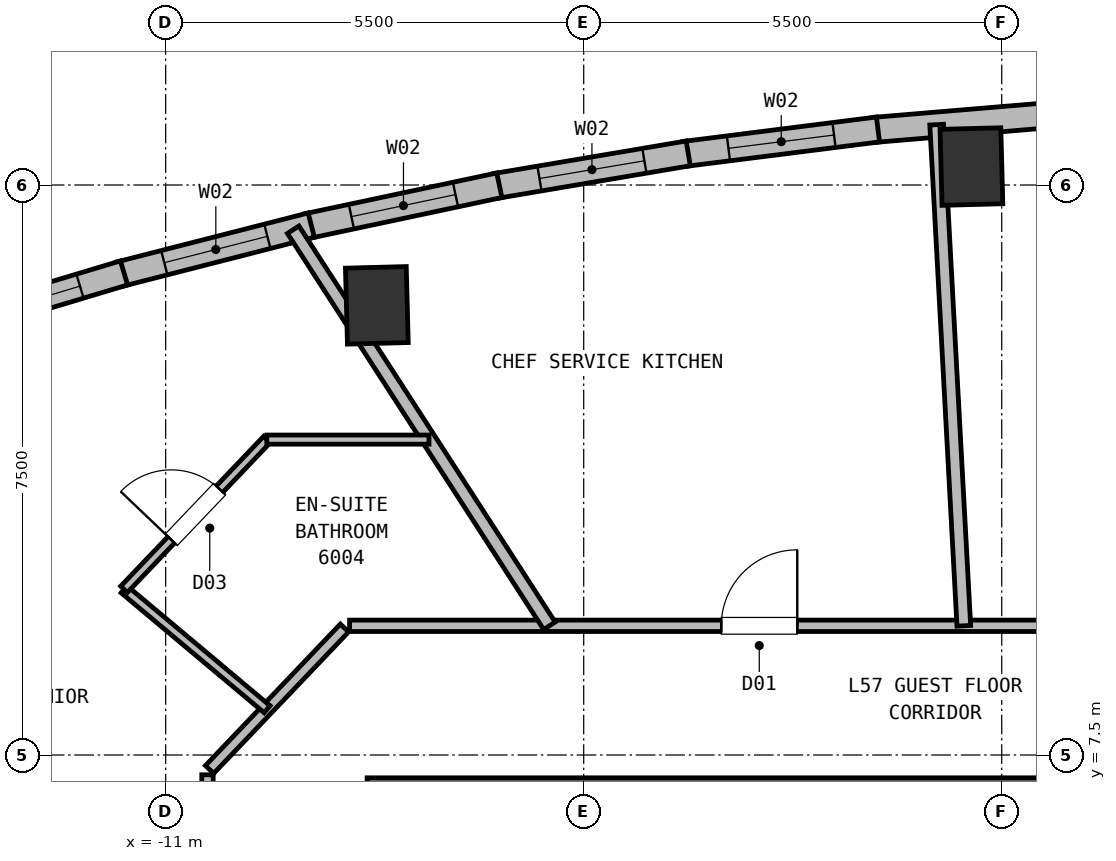
"""IFC4 building model, lengths in metres.
Left out: names, types, materials, properties, quantities, classifications, styles, units other than length and angle.
Written with IfcOpenShell. Run it as: python <this file> out.ifc"""

import sys

from ifc_helpers import new_model, si_unit, direction, frame, frame_2d, origin, origin_2d, place, context, subcontext, project, spatial, rectangle, extrude, element, fill, save


model = new_model("IFC4")
c1 = context("Model", 3, precision=1e-05, world=origin(), true_north=direction((0.0, 1.0)))
c2 = subcontext(c1, "Body", "Model", "MODEL_VIEW")
j1 = project(units=[si_unit("LENGTHUNIT", "METRE"), si_unit("PLANEANGLEUNIT", "RADIAN")], contexts=[c1])
p1 = place(None, origin())
s1 = spatial("IfcSite", under=j1, at=p1, CompositionType="ELEMENT")
p2 = place(p1, origin())
s2 = spatial("IfcBuilding", under=s1, at=p2, CompositionType="ELEMENT")
p3 = place(p2, frame((0.0, 0.0, 228.35)))
s3 = spatial("IfcBuildingStorey", under=s2, at=p3, CompositionType="ELEMENT", Elevation=228.35)
p4 = place(p3, frame((-8.35, 6.95, 0.0), z_axis=(0.0, 0.0, 1.0), x_axis=(1.0, 0.0, 0.0)))
e1 = element("IfcWall", 1, at=p4, inside=s3, PredefinedType="SHEAR", context=c2, shape_type="SweptSolid", body=[
    extrude(rectangle(XDim=16.7, YDim=0.5, at=frame_2d((8.35, 0.0))), origin(), (0.0, 0.0, 1.0), 3.55),
])
for number, where, z_axis, x_axis in (
    (2, (-0.399, 15.243, 0.0), (0.0, 0.0, 1.0), (1.0, 0.026, 0.0)),
    (3, (-8.222, 13.417, 0.0), (0.0, 0.0, 1.0), (1.0, 0.026, 0.0)),
):
    element("IfcColumn", number, at=place(p3, frame(where, z_axis=z_axis, x_axis=x_axis)), inside=s3, PredefinedType="COLUMN", context=c2, shape_type="SweptSolid", body=[
        extrude(rectangle(XDim=0.8, YDim=1.0, at=origin_2d()), origin(), (0.0, 0.0, 1.0), 3.8),
    ])
p5 = place(p3, frame((-1.678, 15.725, 0.0), z_axis=(0.0, 0.0, 1.0), x_axis=(0.996489100747, 0.083722590095, 0.0)))
e4 = element("IfcWall", 4, at=p5, inside=s3, PredefinedType="SOLIDWALL", context=c2, shape_type="SweptSolid", body=[
    extrude(rectangle(XDim=2.566, YDim=0.33, at=frame_2d((1.283, 0.0))), origin(), (0.0, 0.0, 1.0), 3.55),
])
p6 = place(p3, frame((-4.174, 15.409, 0.0), z_axis=(0.0, 0.0, 1.0), x_axis=(0.992107160936, 0.125392907376, 0.0)))
e5 = element("IfcWall", 5, at=p6, inside=s3, PredefinedType="SOLIDWALL", context=c2, shape_type="SweptSolid", body=[
    extrude(rectangle(XDim=2.566, YDim=0.33, at=frame_2d((1.283, 0.0))), origin(), (0.0, 0.0, 1.0), 3.55),
])
p7 = place(p6, frame((0.583, 0.0, 0.72)))
e6 = element("IfcOpeningElement", 6, at=p7, cuts=e5, PredefinedType="OPENING", context=c2, shape_type="SweptSolid", body=[
    extrude(rectangle(XDim=1.4, YDim=1.84, at=frame_2d((0.7, 0.92))), frame((0.0, 0.175, 0.0), z_axis=(0.0, -1.0, 0.0), x_axis=(1.0, 0.0, 0.0)), (0.0, 0.0, 1.0), 0.35),
])
p8 = place(p3, frame((-6.659, 14.988, 0.0), z_axis=(0.0, 0.0, 1.0), x_axis=(0.985993143287, 0.16678585489, 0.0)))
e7 = element("IfcWall", 7, at=p8, inside=s3, PredefinedType="SOLIDWALL", context=c2, shape_type="SweptSolid", body=[
    extrude(rectangle(XDim=2.57, YDim=0.33, at=frame_2d((1.285, 0.0))), origin(), (0.0, 0.0, 1.0), 3.55),
])
p9 = place(p8, frame((0.585, 0.0, 0.72)))
e8 = element("IfcOpeningElement", 8, at=p9, cuts=e7, PredefinedType="OPENING", context=c2, shape_type="SweptSolid", body=[
    extrude(rectangle(XDim=1.4, YDim=1.84, at=frame_2d((0.7, 0.92))), frame((0.0, 0.175, 0.0), z_axis=(0.0, -1.0, 0.0), x_axis=(1.0, 0.0, 0.0)), (0.0, 0.0, 1.0), 0.35),
])
p10 = place(p3, frame((-9.133, 14.461, 0.0), z_axis=(0.0, 0.0, 1.0), x_axis=(0.978200927103, 0.207660651579, 0.0)))
e9 = element("IfcWall", 9, at=p10, inside=s3, PredefinedType="SOLIDWALL", context=c2, shape_type="SweptSolid", body=[
    extrude(rectangle(XDim=2.579, YDim=0.33, at=frame_2d((1.29, 0.0))), origin(), (0.0, 0.0, 1.0), 3.55),
])
p11 = place(p10, frame((0.59, 0.0, 0.72)))
e10 = element("IfcOpeningElement", 10, at=p11, cuts=e9, PredefinedType="OPENING", context=c2, shape_type="SweptSolid", body=[
    extrude(rectangle(XDim=1.4, YDim=1.84, at=frame_2d((0.7, 0.92))), frame((0.0, 0.175, 0.0), z_axis=(0.0, -1.0, 0.0), x_axis=(1.0, 0.0, 0.0)), (0.0, 0.0, 1.0), 0.35),
])
p12 = place(p3, frame((-11.596, 13.83, 0.0), z_axis=(0.0, 0.0, 1.0), x_axis=(0.968775883115, 0.247938073507, 0.0)))
e11 = element("IfcWall", 11, at=p12, inside=s3, PredefinedType="SOLIDWALL", context=c2, shape_type="SweptSolid", body=[
    extrude(rectangle(XDim=2.593, YDim=0.33, at=frame_2d((1.296, 0.0))), origin(), (0.0, 0.0, 1.0), 3.55),
])
p13 = place(p12, frame((0.596, 0.0, 0.72)))
e12 = element("IfcOpeningElement", 12, at=p13, cuts=e11, PredefinedType="OPENING", context=c2, shape_type="SweptSolid", body=[
    extrude(rectangle(XDim=1.4, YDim=1.84, at=frame_2d((0.7, 0.92))), frame((0.0, 0.175, 0.0), z_axis=(0.0, -1.0, 0.0), x_axis=(1.0, 0.0, 0.0)), (0.0, 0.0, 1.0), 0.35),
])
p14 = place(p3, frame((-14.048, 13.094, 0.0), z_axis=(0.0, 0.0, 1.0), x_axis=(0.957870045739, 0.287201976796, 0.0)))
e13 = element("IfcWall", 13, at=p14, inside=s3, PredefinedType="SOLIDWALL", context=c2, shape_type="SweptSolid", body=[
    extrude(rectangle(XDim=2.61, YDim=0.33, at=frame_2d((1.305, 0.0))), origin(), (0.0, 0.0, 1.0), 3.55),
])
p15 = place(p14, frame((0.605, 0.0, 0.72)))
e14 = element("IfcOpeningElement", 14, at=p15, cuts=e13, PredefinedType="OPENING", context=c2, shape_type="SweptSolid", body=[
    extrude(rectangle(XDim=1.4, YDim=1.84, at=frame_2d((0.7, 0.92))), frame((0.0, 0.175, 0.0), z_axis=(0.0, -1.0, 0.0), x_axis=(1.0, 0.0, 0.0)), (0.0, 0.0, 1.0), 0.35),
])
p16 = place(p3, frame((-8.58, 9.2, 0.0), z_axis=(0.0, 0.0, 1.0), x_axis=(1.0, 0.0, 0.0)))
e15 = element("IfcWall", 15, at=p16, inside=s3, PredefinedType="PARTITIONING", context=c2, shape_type="SweptSolid", body=[
    extrude(rectangle(XDim=17.16, YDim=0.15, at=frame_2d((8.58, 0.0))), origin(), (0.0, 0.0, 1.0), 3.55),
])
p17 = place(p16, frame((4.89, 0.0, 0.0)))
e16 = element("IfcOpeningElement", 16, at=p17, cuts=e15, PredefinedType="OPENING", context=c2, shape_type="SweptSolid", body=[
    extrude(rectangle(XDim=1.0, YDim=2.15, at=frame_2d((0.5, 1.075))), frame((0.0, 0.085, 0.0), z_axis=(0.0, -1.0, 0.0), x_axis=(1.0, 0.0, 0.0)), (0.0, 0.0, 1.0), 0.17),
])
p18 = place(p16, frame((11.016, 0.0, 0.0)))
e17 = element("IfcOpeningElement", 17, at=p18, cuts=e15, PredefinedType="OPENING", context=c2, shape_type="SweptSolid", body=[
    extrude(rectangle(XDim=1.0, YDim=2.15, at=frame_2d((0.5, 1.075))), frame((0.0, 0.085, 0.0), z_axis=(0.0, -1.0, 0.0), x_axis=(1.0, 0.0, 0.0)), (0.0, 0.0, 1.0), 0.17),
])
p19 = place(p3, frame((-10.422, 7.309, 0.0), z_axis=(0.0, 0.0, 1.0), x_axis=(0.689960858356, 0.723846678473, 0.0)))
e18 = element("IfcWall", 18, at=p19, inside=s3, PredefinedType="PARTITIONING", context=c2, shape_type="SweptSolid", body=[
    extrude(rectangle(XDim=2.572, YDim=0.15, at=frame_2d((1.286, 0.0))), origin(), (0.0, 0.0, 1.0), 3.55),
])
p20 = place(p3, frame((-10.45, -7.24, 0.0), z_axis=(0.0, 0.0, 1.0), x_axis=(0.0, 1.0, 0.0)))
e19 = element("IfcWall", 19, at=p20, inside=s3, PredefinedType="PARTITIONING", context=c2, shape_type="SweptSolid", body=[
    extrude(rectangle(XDim=14.48, YDim=0.15, at=frame_2d((7.24, 0.0))), origin(), (0.0, 0.0, 1.0), 3.23),
])
p21 = place(p20, frame((6.7, 0.0, 0.0)))
e20 = element("IfcOpeningElement", 20, at=p21, cuts=e19, PredefinedType="OPENING", context=c2, shape_type="SweptSolid", body=[
    extrude(rectangle(XDim=0.95, YDim=2.1, at=frame_2d((0.475, 1.05))), frame((0.0, 0.085, 0.0), z_axis=(0.0, -1.0, 0.0), x_axis=(1.0, 0.0, 0.0)), (0.0, 0.0, 1.0), 0.17),
])
p22 = place(p20, frame((9.251, 0.0, 0.0)))
e21 = element("IfcOpeningElement", 21, at=p22, cuts=e19, PredefinedType="OPENING", context=c2, shape_type="SweptSolid", body=[
    extrude(rectangle(XDim=1.0, YDim=2.15, at=frame_2d((0.5, 1.075))), frame((0.0, 0.085, 0.0), z_axis=(0.0, -1.0, 0.0), x_axis=(1.0, 0.0, 0.0)), (0.0, 0.0, 1.0), 0.17),
])
p23 = place(p20, frame((2.577, 0.0, 0.0)))
e22 = element("IfcOpeningElement", 22, at=p23, cuts=e19, PredefinedType="OPENING", context=c2, shape_type="SweptSolid", body=[
    extrude(rectangle(XDim=1.0, YDim=2.15, at=frame_2d((0.5, 1.075))), frame((0.0, 0.085, 0.0), z_axis=(0.0, -1.0, 0.0), x_axis=(1.0, 0.0, 0.0)), (0.0, 0.0, 1.0), 0.17),
])
p24 = place(p20, frame((12.167, 0.0, 0.0)))
e23 = element("IfcOpeningElement", 23, at=p24, cuts=e19, PredefinedType="OPENING", context=c2, shape_type="SweptSolid", body=[
    extrude(rectangle(XDim=1.06, YDim=2.15, at=frame_2d((0.53, 1.075))), frame((0.0, 0.085, 0.0), z_axis=(0.0, -1.0, 0.0), x_axis=(1.0, 0.0, 0.0)), (0.0, 0.0, 1.0), 0.17),
])
p25 = place(p3, frame((-0.499, 9.2, 0.0), z_axis=(0.0, 0.0, 1.0), x_axis=(-0.054120704993, 0.998534400655, 0.0)))
e24 = element("IfcWall", 24, at=p25, inside=s3, PredefinedType="PARTITIONING", context=c2, shape_type="SweptSolid", body=[
    extrude(rectangle(XDim=6.604, YDim=0.18, at=frame_2d((3.302, 0.0))), origin(), (0.0, 0.0, 1.0), 3.55),
])
p26 = place(p3, frame((-5.951, 9.2, 0.0), z_axis=(0.0, 0.0, 1.0), x_axis=(-0.543119167899, 0.839655625516, 0.0)))
e25 = element("IfcWall", 25, at=p26, inside=s3, PredefinedType="PARTITIONING", context=c2, shape_type="SweptSolid", body=[
    extrude(rectangle(XDim=6.207, YDim=0.18, at=frame_2d((3.104, 0.0))), origin(), (0.0, 0.0, 1.0), 3.55),
])
p27 = place(p3, frame((-9.666, 8.103, 0.0), z_axis=(0.0, 0.0, 1.0), x_axis=(-0.766392114791, 0.64237304301, 0.0)))
e26 = element("IfcWall", 26, at=p27, inside=s3, PredefinedType="PARTITIONING", context=c2, shape_type="SweptSolid", body=[
    extrude(rectangle(XDim=2.455, YDim=0.12, at=frame_2d((1.228, 0.0))), origin(), (0.0, 0.0, 1.0), 3.55),
])
p28 = place(p3, frame((-11.547, 9.68, 0.0), z_axis=(0.0, 0.0, 1.0), x_axis=(0.689950763689, 0.723856300438, 0.0)))
e27 = element("IfcWall", 27, at=p28, inside=s3, PredefinedType="PARTITIONING", context=c2, shape_type="SweptSolid", body=[
    extrude(rectangle(XDim=2.722, YDim=0.12, at=frame_2d((1.361, 0.0))), origin(), (0.0, 0.0, 1.0), 3.55),
])
p29 = place(p28, frame((0.901, 0.0, 0.0)))
e28 = element("IfcOpeningElement", 28, at=p29, cuts=e27, PredefinedType="OPENING", context=c2, shape_type="SweptSolid", body=[
    extrude(rectangle(XDim=0.92, YDim=2.1, at=frame_2d((0.46, 1.05))), frame((0.0, 0.07, 0.0), z_axis=(0.0, -1.0, 0.0), x_axis=(1.0, 0.0, 0.0)), (0.0, 0.0, 1.0), 0.14),
])
p30 = place(p3, frame((-7.536, 11.65, 0.0), z_axis=(0.0, 0.0, 1.0), x_axis=(-1.0, 0.0, 0.0)))
e29 = element("IfcWall", 29, at=p30, inside=s3, PredefinedType="PARTITIONING", context=c2, shape_type="SweptSolid", body=[
    extrude(rectangle(XDim=2.134, YDim=0.12, at=frame_2d((1.067, 0.0))), origin(), (0.0, 0.0, 1.0), 3.55),
])
p31 = place(p3, frame((-10.45, 3.775, 0.0), z_axis=(0.0, 0.0, 1.0), x_axis=(-0.9405132002, 0.339757148931, 0.0)))
e30 = element("IfcWall", 30, at=p31, inside=s3, PredefinedType="PARTITIONING", context=c2, shape_type="SweptSolid", body=[
    extrude(rectangle(XDim=11.287, YDim=0.18, at=frame_2d((5.643, 0.0))), origin(), (0.0, 0.0, 1.0), 3.55),
])
p32 = place(p7, origin())
e31 = element("IfcWindow", 31, at=p32, inside=s3, PartitioningType="SINGLE_PANEL", PredefinedType="WINDOW", context=c2, shape_type="SweptSolid", body=[
    extrude(rectangle(XDim=1.4, YDim=1.84, at=frame_2d((0.7, 0.92))), frame((0.0, 0.03, 0.0), z_axis=(0.0, -1.0, 0.0), x_axis=(1.0, 0.0, 0.0)), (0.0, 0.0, 1.0), 0.06),
])
fill(e6, e31)
p33 = place(p9, origin())
e32 = element("IfcWindow", 32, at=p33, inside=s3, PartitioningType="SINGLE_PANEL", PredefinedType="WINDOW", context=c2, shape_type="SweptSolid", body=[
    extrude(rectangle(XDim=1.4, YDim=1.84, at=frame_2d((0.7, 0.92))), frame((0.0, 0.03, 0.0), z_axis=(0.0, -1.0, 0.0), x_axis=(1.0, 0.0, 0.0)), (0.0, 0.0, 1.0), 0.06),
])
fill(e8, e32)
p34 = place(p11, origin())
e33 = element("IfcWindow", 33, at=p34, inside=s3, PartitioningType="SINGLE_PANEL", PredefinedType="WINDOW", context=c2, shape_type="SweptSolid", body=[
    extrude(rectangle(XDim=1.4, YDim=1.84, at=frame_2d((0.7, 0.92))), frame((0.0, 0.03, 0.0), z_axis=(0.0, -1.0, 0.0), x_axis=(1.0, 0.0, 0.0)), (0.0, 0.0, 1.0), 0.06),
])
fill(e10, e33)
p35 = place(p13, origin())
e34 = element("IfcWindow", 34, at=p35, inside=s3, PartitioningType="SINGLE_PANEL", PredefinedType="WINDOW", context=c2, shape_type="SweptSolid", body=[
    extrude(rectangle(XDim=1.4, YDim=1.84, at=frame_2d((0.7, 0.92))), frame((0.0, 0.03, 0.0), z_axis=(0.0, -1.0, 0.0), x_axis=(1.0, 0.0, 0.0)), (0.0, 0.0, 1.0), 0.06),
])
fill(e12, e34)
p36 = place(p15, origin())
e35 = element("IfcWindow", 35, at=p36, inside=s3, PartitioningType="SINGLE_PANEL", PredefinedType="WINDOW", context=c2, shape_type="SweptSolid", body=[
    extrude(rectangle(XDim=1.4, YDim=1.84, at=frame_2d((0.7, 0.92))), frame((0.0, 0.03, 0.0), z_axis=(0.0, -1.0, 0.0), x_axis=(1.0, 0.0, 0.0)), (0.0, 0.0, 1.0), 0.06),
])
fill(e14, e35)
p37 = place(p29, origin())
e36 = element("IfcDoor", 36, at=p37, inside=s3, OperationType="SINGLE_SWING_LEFT", PredefinedType="DOOR", context=c2, shape_type="SweptSolid", body=[
    extrude(rectangle(XDim=0.92, YDim=2.1, at=frame_2d((0.46, 1.05))), frame((0.0, 0.025, 0.0), z_axis=(0.0, -1.0, 0.0), x_axis=(1.0, 0.0, 0.0)), (0.0, 0.0, 1.0), 0.05),
])
fill(e28, e36)
p38 = place(p17, origin())
e37 = element("IfcDoor", 37, at=p38, inside=s3, OperationType="SINGLE_SWING_RIGHT", PredefinedType="DOOR", context=c2, shape_type="SweptSolid", body=[
    extrude(rectangle(XDim=1.0, YDim=2.15, at=frame_2d((0.5, 1.075))), frame((0.0, 0.025, 0.0), z_axis=(0.0, -1.0, 0.0), x_axis=(1.0, 0.0, 0.0)), (0.0, 0.0, 1.0), 0.05),
])
fill(e16, e37)
save(model, sys.argv[1])
